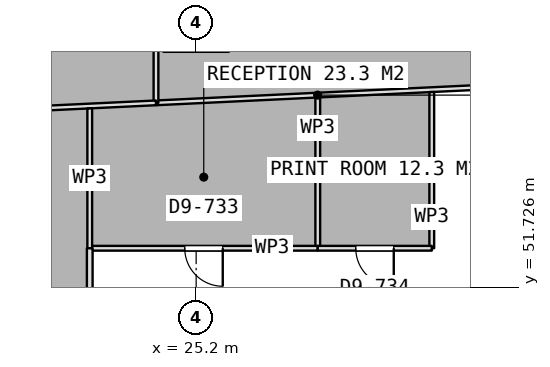
"""IFC4 building model, lengths in metres.
Left out: names, types, materials, properties, quantities, classifications, styles, units other than length and angle.
Written with IfcOpenShell. Run it as: python <this file> out.ifc"""

import sys

from ifc_helpers import new_model, si_unit, direction, frame, frame_2d, origin, place, context, subcontext, project, spatial, rectangle, extrude, element, fill, save


model = new_model("IFC4")
c1 = context("Model", 3, precision=1e-05, world=origin(), true_north=direction((0.0, 1.0)))
c2 = subcontext(c1, "Body", "Model", "MODEL_VIEW")
j1 = project(units=[si_unit("LENGTHUNIT", "METRE"), si_unit("PLANEANGLEUNIT", "RADIAN")], contexts=[c1])
p1 = place(None, origin())
s1 = spatial("IfcSite", under=j1, at=p1, CompositionType="ELEMENT")
p2 = place(p1, origin())
s2 = spatial("IfcBuilding", under=s1, at=p2, CompositionType="ELEMENT")
p3 = place(p2, frame((0.0, 0.0, 183.95)))
s3 = spatial("IfcBuildingStorey", under=s2, at=p3, CompositionType="ELEMENT", Elevation=183.95)
p4 = place(p3, frame((32.649, 56.983, 0.0), z_axis=(0.0, 0.0, 1.0), x_axis=(-0.998857279552, -0.047792625861, 0.0)))
e1 = element("IfcWall", 1, at=p4, inside=s3, PredefinedType="PARTITIONING", context=c2, shape_type="SweptSolid", body=[
    extrude(rectangle(XDim=8.516, YDim=0.125, at=frame_2d((4.258, 0.0))), origin(), (0.0, 0.0, 1.0), 3.5),
])
p5 = place(p3, frame((24.143, 56.576, 0.0), z_axis=(0.0, 0.0, 1.0), x_axis=(0.0, 1.0, 0.0)))
e2 = element("IfcWall", 2, at=p5, inside=s3, PredefinedType="PARTITIONING", context=c2, shape_type="SweptSolid", body=[
    extrude(rectangle(XDim=4.455, YDim=0.125, at=frame_2d((2.228, 0.0))), origin(), (0.0, 0.0, 1.0), 3.5),
])
p6 = place(p3, frame((24.142, 56.576, 0.0), z_axis=(0.0, 0.0, 1.0), x_axis=(-0.998859773086, -0.047740482938, 0.0)))
e3 = element("IfcWall", 3, at=p6, inside=s3, PredefinedType="PARTITIONING", context=c2, shape_type="SweptSolid", body=[
    extrude(rectangle(XDim=8.336, YDim=0.125, at=frame_2d((4.168, 0.0))), origin(), (0.0, 0.0, 1.0), 3.5),
])
p7 = place(p6, frame((3.668, 0.0, 0.0)))
e4 = element("IfcOpeningElement", 4, at=p7, cuts=e3, PredefinedType="OPENING", context=c2, shape_type="SweptSolid", body=[
    extrude(rectangle(XDim=1.0, YDim=2.1, at=frame_2d((0.5, 1.05))), frame((0.0, 0.073, 0.0), z_axis=(0.0, -1.0, 0.0), x_axis=(1.0, 0.0, 0.0)), (0.0, 0.0, 1.0), 0.145),
])
p8 = place(p3, frame((28.4, 56.717, 0.0), z_axis=(0.0, 0.0, 1.0), x_axis=(0.0, -1.0, 0.0)))
e5 = element("IfcWall", 5, at=p8, inside=s3, PredefinedType="PARTITIONING", context=c2, shape_type="SweptSolid", body=[
    extrude(rectangle(XDim=3.967, YDim=0.125, at=frame_2d((1.983, 0.0))), origin(), (0.0, 0.0, 1.0), 3.5),
])
p9 = place(p3, frame((28.4, 52.75, 0.0), z_axis=(0.0, 0.0, 1.0), x_axis=(-1.0, 0.0, 0.0)))
e6 = element("IfcWall", 6, at=p9, inside=s3, PredefinedType="PARTITIONING", context=c2, shape_type="SweptSolid", body=[
    extrude(rectangle(XDim=6.0, YDim=0.125, at=frame_2d((3.0, 0.0))), origin(), (0.0, 0.0, 1.0), 3.5),
])
p10 = place(p9, frame((2.5, 0.0, 0.0)))
e7 = element("IfcOpeningElement", 7, at=p10, cuts=e6, PredefinedType="OPENING", context=c2, shape_type="SweptSolid", body=[
    extrude(rectangle(XDim=1.0, YDim=2.1, at=frame_2d((0.5, 1.05))), frame((0.0, 0.073, 0.0), z_axis=(0.0, -1.0, 0.0), x_axis=(1.0, 0.0, 0.0)), (0.0, 0.0, 1.0), 0.145),
])
p11 = place(p3, frame((22.4, 52.75, 0.0), z_axis=(0.0, 0.0, 1.0), x_axis=(0.0, 1.0, 0.0)))
e8 = element("IfcWall", 8, at=p11, inside=s3, PredefinedType="PARTITIONING", context=c2, shape_type="SweptSolid", body=[
    extrude(rectangle(XDim=3.68, YDim=0.125, at=frame_2d((1.84, 0.0))), origin(), (0.0, 0.0, 1.0), 3.5),
])
p12 = place(p3, frame((31.4, 56.861, 0.0), z_axis=(0.0, 0.0, 1.0), x_axis=(0.0, -1.0, 0.0)))
e9 = element("IfcWall", 9, at=p12, inside=s3, PredefinedType="PARTITIONING", context=c2, shape_type="SweptSolid", body=[
    extrude(rectangle(XDim=4.111, YDim=0.125, at=frame_2d((2.056, 0.0))), origin(), (0.0, 0.0, 1.0), 3.5),
])
p13 = place(p3, frame((31.4, 52.75, 0.0), z_axis=(0.0, 0.0, 1.0), x_axis=(-1.0, 0.0, 0.0)))
e10 = element("IfcWall", 10, at=p13, inside=s3, PredefinedType="PARTITIONING", context=c2, shape_type="SweptSolid", body=[
    extrude(rectangle(XDim=3.0, YDim=0.125, at=frame_2d((1.5, 0.0))), origin(), (0.0, 0.0, 1.0), 3.5),
])
p14 = place(p13, frame((1.0, 0.0, 0.0)))
e11 = element("IfcOpeningElement", 11, at=p14, cuts=e10, PredefinedType="OPENING", context=c2, shape_type="SweptSolid", body=[
    extrude(rectangle(XDim=1.0, YDim=2.1, at=frame_2d((0.5, 1.05))), frame((0.0, 0.073, 0.0), z_axis=(0.0, -1.0, 0.0), x_axis=(1.0, 0.0, 0.0)), (0.0, 0.0, 1.0), 0.145),
])
p15 = place(p3, frame((22.4, 52.75, 0.0), z_axis=(0.0, 0.0, 1.0), x_axis=(0.0, -1.0, 0.0)))
e12 = element("IfcWall", 12, at=p15, inside=s3, PredefinedType="PARTITIONING", context=c2, shape_type="SweptSolid", body=[
    extrude(rectangle(XDim=24.675, YDim=0.15, at=frame_2d((12.337, 0.0))), origin(), (0.0, 0.0, 1.0), 3.5),
])
p16 = place(p15, frame((11.875, 0.0, 0.0)))
e13 = element("IfcOpeningElement", 13, at=p16, cuts=e12, PredefinedType="OPENING", context=c2, shape_type="SweptSolid", body=[
    extrude(rectangle(XDim=1.0, YDim=2.1, at=frame_2d((0.5, 1.05))), frame((0.0, 0.085, 0.0), z_axis=(0.0, -1.0, 0.0), x_axis=(1.0, 0.0, 0.0)), (0.0, 0.0, 1.0), 0.17),
])
p17 = place(p10, origin())
e14 = element("IfcDoor", 14, at=p17, inside=s3, OperationType="SINGLE_SWING_LEFT", PredefinedType="DOOR", context=c2, shape_type="SweptSolid", body=[
    extrude(rectangle(XDim=1.0, YDim=2.1, at=frame_2d((0.5, 1.05))), frame((0.0, 0.025, 0.0), z_axis=(0.0, -1.0, 0.0), x_axis=(1.0, 0.0, 0.0)), (0.0, 0.0, 1.0), 0.05),
])
fill(e7, e14)
p18 = place(p14, origin())
e15 = element("IfcDoor", 15, at=p18, inside=s3, OperationType="SINGLE_SWING_LEFT", PredefinedType="DOOR", context=c2, shape_type="SweptSolid", body=[
    extrude(rectangle(XDim=1.0, YDim=2.1, at=frame_2d((0.5, 1.05))), frame((0.0, 0.025, 0.0), z_axis=(0.0, -1.0, 0.0), x_axis=(1.0, 0.0, 0.0)), (0.0, 0.0, 1.0), 0.05),
])
fill(e11, e15)
save(model, sys.argv[1])
